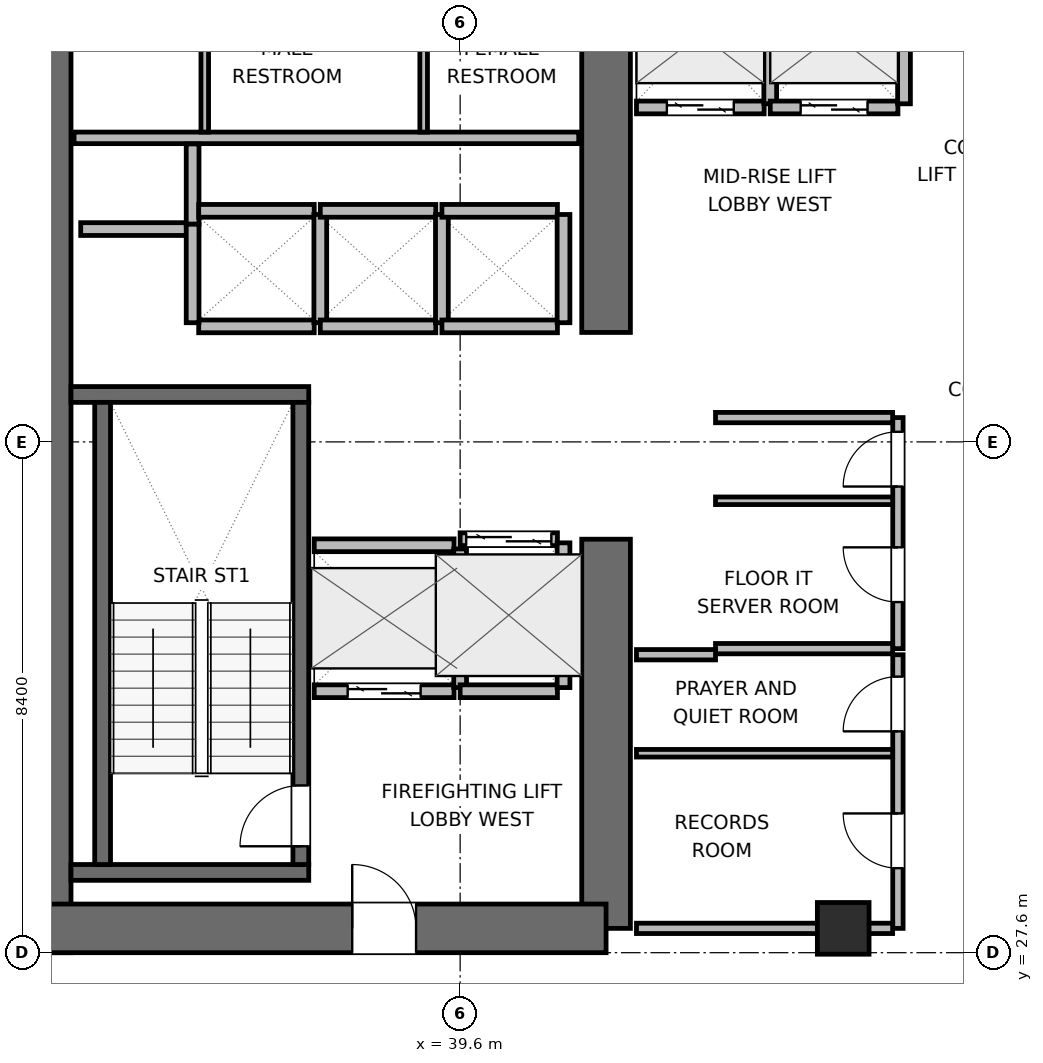
"""IFC4 building model, lengths in metres.
Left out: names, types, materials, properties, quantities, classifications, styles, units other than length and angle.
Written with IfcOpenShell. Run it as: python <this file> out.ifc"""

import sys

from ifc_helpers import new_model, si_unit, direction, frame, frame_2d, origin, origin_2d, place, context, subcontext, project, spatial, rectangle, extrude, element, fill, save


model = new_model("IFC4")
c1 = context("Model", 3, precision=1e-05, world=origin(), true_north=direction((0.0, 1.0)))
c2 = subcontext(c1, "Body", "Model", "MODEL_VIEW")
j1 = project(units=[si_unit("LENGTHUNIT", "METRE"), si_unit("PLANEANGLEUNIT", "RADIAN")], contexts=[c1])
p1 = place(None, origin())
s1 = spatial("IfcSite", under=j1, at=p1, CompositionType="ELEMENT")
p2 = place(p1, origin())
s2 = spatial("IfcBuilding", under=s1, at=p2, CompositionType="ELEMENT")
p3 = place(p2, frame((0.0, 0.0, 174.0)))
s3 = spatial("IfcBuildingStorey", under=s2, at=p3, CompositionType="ELEMENT", Elevation=174.0)
p4 = place(p3, frame((32.8, 27.6, 0.0), z_axis=(0.0, 0.0, 1.0), x_axis=(0.0, 1.0, 0.0)))
e1 = element("IfcWall", 1, at=p4, inside=s3, PredefinedType="SHEAR", context=c2, shape_type="SweptSolid", body=[
    extrude(rectangle(XDim=16.8, YDim=0.8, at=frame_2d((8.4, 0.0))), origin(), (0.0, 0.0, 1.0), 3.9),
])
p5 = place(p3, frame((42.0, 28.0, 0.0), z_axis=(0.0, 0.0, 1.0), x_axis=(0.0, 1.0, 0.0)))
e2 = element("IfcWall", 2, at=p5, inside=s3, PredefinedType="SHEAR", context=c2, shape_type="SweptSolid", body=[
    extrude(rectangle(XDim=6.4, YDim=0.8, at=frame_2d((3.2, 0.0))), origin(), (0.0, 0.0, 1.0), 3.9),
])
p6 = place(p3, frame((42.0, 37.8, 0.0), z_axis=(0.0, 0.0, 1.0), x_axis=(0.0, 1.0, 0.0)))
e3 = element("IfcWall", 3, at=p6, inside=s3, PredefinedType="SHEAR", context=c2, shape_type="SweptSolid", body=[
    extrude(rectangle(XDim=6.2, YDim=0.8, at=frame_2d((3.1, 0.0))), origin(), (0.0, 0.0, 1.0), 3.9),
])
p7 = place(p3, frame((32.8, 28.0, 0.0), z_axis=(0.0, 0.0, 1.0), x_axis=(1.0, 0.0, 0.0)))
e4 = element("IfcWall", 4, at=p7, inside=s3, PredefinedType="SHEAR", context=c2, shape_type="SweptSolid", body=[
    extrude(rectangle(XDim=9.2, YDim=0.8, at=frame_2d((4.6, 0.0))), origin(), (0.0, 0.0, 1.0), 3.9),
])
p8 = place(p7, frame((5.025, 0.0, 0.0)))
e5 = element("IfcOpeningElement", 5, at=p8, cuts=e4, PredefinedType="OPENING", context=c2, shape_type="SweptSolid", body=[
    extrude(rectangle(XDim=1.05, YDim=2.04, at=frame_2d((0.525, 1.02))), frame((0.0, 0.41, 0.0), z_axis=(0.0, -1.0, 0.0), x_axis=(1.0, 0.0, 0.0)), (0.0, 0.0, 1.0), 0.82),
])
for number, where, z_axis, x_axis in (
    (6, (33.2, 28.92, 0.0), (0.0, 0.0, 1.0), (1.0, 0.0, 0.0)),
    (7, (33.2, 36.78, 0.0), (0.0, 0.0, 1.0), (1.0, 0.0, 0.0)),
):
    element("IfcWall", number, at=place(p3, frame(where, z_axis=z_axis, x_axis=x_axis)), inside=s3, PredefinedType="SHEAR", context=c2, shape_type="SweptSolid", body=[
        extrude(rectangle(XDim=3.91, YDim=0.26, at=frame_2d((1.955, 0.0))), origin(), (0.0, 0.0, 1.0), 3.9),
    ])
p9 = place(p3, frame((33.72, 29.05, 0.0), z_axis=(0.0, 0.0, 1.0), x_axis=(0.0, 1.0, 0.0)))
e8 = element("IfcWall", 8, at=p9, inside=s3, PredefinedType="SHEAR", context=c2, shape_type="SweptSolid", body=[
    extrude(rectangle(XDim=7.6, YDim=0.26, at=frame_2d((3.8, 0.0))), origin(), (0.0, 0.0, 1.0), 3.9),
])
p10 = place(p3, frame((36.98, 29.05, 0.0), z_axis=(0.0, 0.0, 1.0), x_axis=(0.0, 1.0, 0.0)))
e9 = element("IfcWall", 9, at=p10, inside=s3, PredefinedType="SHEAR", context=c2, shape_type="SweptSolid", body=[
    extrude(rectangle(XDim=7.6, YDim=0.26, at=frame_2d((3.8, 0.0))), origin(), (0.0, 0.0, 1.0), 3.9),
])
p11 = place(p10, frame((0.3, 0.0, 0.0)))
e10 = element("IfcOpeningElement", 10, at=p11, cuts=e9, PredefinedType="OPENING", context=c2, shape_type="SweptSolid", body=[
    extrude(rectangle(XDim=1.0, YDim=2.04, at=frame_2d((0.5, 1.02))), frame((0.0, 0.14, 0.0), z_axis=(0.0, -1.0, 0.0), x_axis=(1.0, 0.0, 0.0)), (0.0, 0.0, 1.0), 0.28),
])
p12 = place(p3, frame((45.9, 28.0, 0.0), z_axis=(0.0, 0.0, 1.0), x_axis=(1.0, 0.0, 0.0)))
e11 = element("IfcColumn", 11, at=p12, inside=s3, PredefinedType="COLUMN", context=c2, shape_type="SweptSolid", body=[
    extrude(rectangle(XDim=0.85, YDim=0.85, at=origin_2d()), origin(), (0.0, 0.0, 1.0), 3.9),
])
p13 = place(p3, frame((33.25, 41.0, 0.0), z_axis=(0.0, 0.0, 1.0), x_axis=(1.0, 0.0, 0.0)))
e12 = element("IfcWall", 12, at=p13, inside=s3, PredefinedType="PLUMBINGWALL", context=c2, shape_type="SweptSolid", body=[
    extrude(rectangle(XDim=8.3, YDim=0.19, at=frame_2d((4.15, 0.0))), origin(), (0.0, 0.0, 1.0), 3.68),
])
for number, where, z_axis, x_axis in (
    (13, (35.4, 41.095, 0.0), (0.0, 0.0, 1.0), (0.0, 1.0, 0.0)),
    (14, (39.0, 41.095, 0.0), (0.0, 0.0, 1.0), (0.0, 1.0, 0.0)),
):
    element("IfcWall", number, at=place(p3, frame(where, z_axis=z_axis, x_axis=x_axis)), inside=s3, PredefinedType="PARTITIONING", context=c2, shape_type="SweptSolid", body=[
        extrude(rectangle(XDim=2.455, YDim=0.125, at=frame_2d((1.228, 0.0))), origin(), (0.0, 0.0, 1.0), 3.68),
    ])
p14 = place(p3, frame((33.36, 39.5, 0.0), z_axis=(0.0, 0.0, 1.0), x_axis=(1.0, 0.0, 0.0)))
e15 = element("IfcWall", 15, at=p14, inside=s3, PredefinedType="PARTITIONING", context=c2, shape_type="SweptSolid", body=[
    extrude(rectangle(XDim=1.86, YDim=0.21, at=frame_2d((0.93, 0.0))), origin(), (0.0, 0.0, 1.0), 3.68),
])
p15 = place(p3, frame((35.2, 39.58, 0.0), z_axis=(0.0, 0.0, 1.0), x_axis=(0.0, 1.0, 0.0)))
e16 = element("IfcWall", 16, at=p15, inside=s3, PredefinedType="PARTITIONING", context=c2, shape_type="SweptSolid", body=[
    extrude(rectangle(XDim=1.32, YDim=0.21, at=frame_2d((0.66, 0.0))), origin(), (0.0, 0.0, 1.0), 3.68),
])
p16 = place(p3, frame((37.2, 31.9, 0.0), z_axis=(0.0, 0.0, 1.0), x_axis=(1.0, 0.0, 0.0)))
e17 = element("IfcWall", 17, at=p16, inside=s3, PredefinedType="PARTITIONING", context=c2, shape_type="SweptSolid", body=[
    extrude(rectangle(XDim=2.3, YDim=0.21, at=frame_2d((1.15, 0.0))), origin(), (0.0, 0.0, 1.0), 3.68),
])
p17 = place(p16, frame((0.55, 0.0, 0.0)))
e18 = element("IfcOpeningElement", 18, at=p17, cuts=e17, PredefinedType="OPENING", context=c2, shape_type="SweptSolid", body=[
    extrude(rectangle(XDim=1.2, YDim=2.04, at=frame_2d((0.6, 1.02))), frame((0.0, 0.115, 0.0), z_axis=(0.0, -1.0, 0.0), x_axis=(1.0, 0.0, 0.0)), (0.0, 0.0, 1.0), 0.23),
])
p18 = place(p3, frame((37.2, 34.3, 0.0), z_axis=(0.0, 0.0, 1.0), x_axis=(1.0, 0.0, 0.0)))
e19 = element("IfcWall", 19, at=p18, inside=s3, PredefinedType="PARTITIONING", context=c2, shape_type="SweptSolid", body=[
    extrude(rectangle(XDim=2.3, YDim=0.21, at=frame_2d((1.15, 0.0))), origin(), (0.0, 0.0, 1.0), 3.68),
])
p19 = place(p3, frame((39.6, 31.96, 0.0), z_axis=(0.0, 0.0, 1.0), x_axis=(0.0, 1.0, 0.0)))
e20 = element("IfcWall", 20, at=p19, inside=s3, PredefinedType="PARTITIONING", context=c2, shape_type="SweptSolid", body=[
    extrude(rectangle(XDim=2.28, YDim=0.21, at=frame_2d((1.14, 0.0))), origin(), (0.0, 0.0, 1.0), 3.68),
])
p20 = place(p3, frame((39.6, 34.4, 0.0), z_axis=(0.0, 0.0, 1.0), x_axis=(1.0, 0.0, 0.0)))
e21 = element("IfcWall", 21, at=p20, inside=s3, PredefinedType="PARTITIONING", context=c2, shape_type="SweptSolid", body=[
    extrude(rectangle(XDim=1.6, YDim=0.21, at=frame_2d((0.8, 0.0))), origin(), (0.0, 0.0, 1.0), 3.68),
])
p21 = place(p20, frame((0.1, 0.0, 0.0)))
e22 = element("IfcOpeningElement", 22, at=p21, cuts=e21, PredefinedType="OPENING", context=c2, shape_type="SweptSolid", body=[
    extrude(rectangle(XDim=1.4, YDim=2.06, at=frame_2d((0.7, 1.03))), frame((0.0, 0.115, 0.0), z_axis=(0.0, -1.0, 0.0), x_axis=(1.0, 0.0, 0.0)), (0.0, 0.0, 1.0), 0.23),
])
p22 = place(p3, frame((39.6, 31.9, 0.0), z_axis=(0.0, 0.0, 1.0), x_axis=(1.0, 0.0, 0.0)))
e23 = element("IfcWall", 23, at=p22, inside=s3, PredefinedType="PARTITIONING", context=c2, shape_type="SweptSolid", body=[
    extrude(rectangle(XDim=1.6, YDim=0.21, at=frame_2d((0.8, 0.0))), origin(), (0.0, 0.0, 1.0), 3.68),
])
p23 = place(p3, frame((41.3, 31.96, 0.0), z_axis=(0.0, 0.0, 1.0), x_axis=(0.0, 1.0, 0.0)))
e24 = element("IfcWall", 24, at=p23, inside=s3, PredefinedType="PARTITIONING", context=c2, shape_type="SweptSolid", body=[
    extrude(rectangle(XDim=2.38, YDim=0.21, at=frame_2d((1.19, 0.0))), origin(), (0.0, 0.0, 1.0), 3.68),
])
p24 = place(p3, frame((42.5, 41.5, 0.0), z_axis=(0.0, 0.0, 1.0), x_axis=(1.0, 0.0, 0.0)))
e25 = element("IfcWall", 25, at=p24, inside=s3, PredefinedType="PARTITIONING", context=c2, shape_type="SweptSolid", body=[
    extrude(rectangle(XDim=2.1, YDim=0.21, at=frame_2d((1.05, 0.0))), origin(), (0.0, 0.0, 1.0), 3.68),
])
p25 = place(p24, frame((0.5, 0.0, 0.0)))
e26 = element("IfcOpeningElement", 26, at=p25, cuts=e25, PredefinedType="OPENING", context=c2, shape_type="SweptSolid", body=[
    extrude(rectangle(XDim=1.1, YDim=2.04, at=frame_2d((0.55, 1.02))), frame((0.0, 0.115, 0.0), z_axis=(0.0, -1.0, 0.0), x_axis=(1.0, 0.0, 0.0)), (0.0, 0.0, 1.0), 0.23),
])
p26 = place(p3, frame((44.7, 41.56, 0.0), z_axis=(0.0, 0.0, 1.0), x_axis=(0.0, 1.0, 0.0)))
e27 = element("IfcWall", 27, at=p26, inside=s3, PredefinedType="PARTITIONING", context=c2, shape_type="SweptSolid", body=[
    extrude(rectangle(XDim=2.28, YDim=0.21, at=frame_2d((1.14, 0.0))), origin(), (0.0, 0.0, 1.0), 3.68),
])
p27 = place(p3, frame((44.7, 41.5, 0.0), z_axis=(0.0, 0.0, 1.0), x_axis=(1.0, 0.0, 0.0)))
e28 = element("IfcWall", 28, at=p27, inside=s3, PredefinedType="PARTITIONING", context=c2, shape_type="SweptSolid", body=[
    extrude(rectangle(XDim=2.1, YDim=0.21, at=frame_2d((1.05, 0.0))), origin(), (0.0, 0.0, 1.0), 3.68),
])
p28 = place(p27, frame((0.5, 0.0, 0.0)))
e29 = element("IfcOpeningElement", 29, at=p28, cuts=e28, PredefinedType="OPENING", context=c2, shape_type="SweptSolid", body=[
    extrude(rectangle(XDim=1.1, YDim=2.04, at=frame_2d((0.55, 1.02))), frame((0.0, 0.115, 0.0), z_axis=(0.0, -1.0, 0.0), x_axis=(1.0, 0.0, 0.0)), (0.0, 0.0, 1.0), 0.23),
])
p29 = place(p3, frame((46.9, 41.56, 0.0), z_axis=(0.0, 0.0, 1.0), x_axis=(0.0, 1.0, 0.0)))
e30 = element("IfcWall", 30, at=p29, inside=s3, PredefinedType="PARTITIONING", context=c2, shape_type="SweptSolid", body=[
    extrude(rectangle(XDim=2.28, YDim=0.21, at=frame_2d((1.14, 0.0))), origin(), (0.0, 0.0, 1.0), 3.68),
])
for number, where, z_axis, x_axis in (
    (31, (35.3, 37.9, 0.0), (0.0, 0.0, 1.0), (1.0, 0.0, 0.0)),
    (32, (35.3, 39.8, 0.0), (0.0, 0.0, 1.0), (1.0, 0.0, 0.0)),
):
    element("IfcWall", number, at=place(p3, frame(where, z_axis=z_axis, x_axis=x_axis)), inside=s3, PredefinedType="PARTITIONING", context=c2, shape_type="SweptSolid", body=[
        extrude(rectangle(XDim=1.9, YDim=0.21, at=frame_2d((0.95, 0.0))), origin(), (0.0, 0.0, 1.0), 3.68),
    ])
p30 = place(p3, frame((35.2, 37.96, 0.0), z_axis=(0.0, 0.0, 1.0), x_axis=(0.0, 1.0, 0.0)))
e33 = element("IfcWall", 33, at=p30, inside=s3, PredefinedType="PARTITIONING", context=c2, shape_type="SweptSolid", body=[
    extrude(rectangle(XDim=1.62, YDim=0.21, at=frame_2d((0.81, 0.0))), origin(), (0.0, 0.0, 1.0), 3.68),
])
p31 = place(p3, frame((37.3, 37.96, 0.0), z_axis=(0.0, 0.0, 1.0), x_axis=(0.0, 1.0, 0.0)))
e34 = element("IfcWall", 34, at=p31, inside=s3, PredefinedType="PARTITIONING", context=c2, shape_type="SweptSolid", body=[
    extrude(rectangle(XDim=1.78, YDim=0.21, at=frame_2d((0.89, 0.0))), origin(), (0.0, 0.0, 1.0), 3.68),
])
for number, where, z_axis, x_axis in (
    (35, (37.3, 37.9, 0.0), (0.0, 0.0, 1.0), (1.0, 0.0, 0.0)),
    (36, (37.3, 39.8, 0.0), (0.0, 0.0, 1.0), (1.0, 0.0, 0.0)),
):
    element("IfcWall", number, at=place(p3, frame(where, z_axis=z_axis, x_axis=x_axis)), inside=s3, PredefinedType="PARTITIONING", context=c2, shape_type="SweptSolid", body=[
        extrude(rectangle(XDim=1.9, YDim=0.21, at=frame_2d((0.95, 0.0))), origin(), (0.0, 0.0, 1.0), 3.68),
    ])
p32 = place(p3, frame((39.3, 37.96, 0.0), z_axis=(0.0, 0.0, 1.0), x_axis=(0.0, 1.0, 0.0)))
e37 = element("IfcWall", 37, at=p32, inside=s3, PredefinedType="PARTITIONING", context=c2, shape_type="SweptSolid", body=[
    extrude(rectangle(XDim=1.78, YDim=0.21, at=frame_2d((0.89, 0.0))), origin(), (0.0, 0.0, 1.0), 3.68),
])
for number, where, z_axis, x_axis in (
    (38, (39.3, 37.9, 0.0), (0.0, 0.0, 1.0), (1.0, 0.0, 0.0)),
    (39, (39.3, 39.8, 0.0), (0.0, 0.0, 1.0), (1.0, 0.0, 0.0)),
):
    element("IfcWall", number, at=place(p3, frame(where, z_axis=z_axis, x_axis=x_axis)), inside=s3, PredefinedType="PARTITIONING", context=c2, shape_type="SweptSolid", body=[
        extrude(rectangle(XDim=1.9, YDim=0.21, at=frame_2d((0.95, 0.0))), origin(), (0.0, 0.0, 1.0), 3.68),
    ])
p33 = place(p3, frame((41.3, 37.96, 0.0), z_axis=(0.0, 0.0, 1.0), x_axis=(0.0, 1.0, 0.0)))
e40 = element("IfcWall", 40, at=p33, inside=s3, PredefinedType="PARTITIONING", context=c2, shape_type="SweptSolid", body=[
    extrude(rectangle(XDim=1.78, YDim=0.21, at=frame_2d((0.89, 0.0))), origin(), (0.0, 0.0, 1.0), 3.68),
])
p34 = place(p3, frame((46.8, 32.6, 0.0), z_axis=(0.0, 0.0, 1.0), x_axis=(0.0, 1.0, 0.0)))
e41 = element("IfcWall", 41, at=p34, inside=s3, PredefinedType="PARTITIONING", context=c2, shape_type="SweptSolid", body=[
    extrude(rectangle(XDim=3.8, YDim=0.17, at=frame_2d((1.9, 0.0))), origin(), (0.0, 0.0, 1.0), 3.68),
])
p35 = place(p34, frame((0.766, 0.0, 0.0)))
e42 = element("IfcOpeningElement", 42, at=p35, cuts=e41, PredefinedType="OPENING", context=c2, shape_type="SweptSolid", body=[
    extrude(rectangle(XDim=0.9, YDim=2.02, at=frame_2d((0.45, 1.01))), frame((0.0, 0.095, 0.0), z_axis=(0.0, -1.0, 0.0), x_axis=(1.0, 0.0, 0.0)), (0.0, 0.0, 1.0), 0.19),
])
p36 = place(p34, frame((2.666, 0.0, 0.0)))
e43 = element("IfcOpeningElement", 43, at=p36, cuts=e41, PredefinedType="OPENING", context=c2, shape_type="SweptSolid", body=[
    extrude(rectangle(XDim=0.9, YDim=2.02, at=frame_2d((0.45, 1.01))), frame((0.0, 0.095, 0.0), z_axis=(0.0, -1.0, 0.0), x_axis=(1.0, 0.0, 0.0)), (0.0, 0.0, 1.0), 0.19),
])
for number, where, z_axis, x_axis in (
    (44, (43.8, 32.6, 0.0), (0.0, 0.0, 1.0), (1.0, 0.0, 0.0)),
    (45, (43.8, 36.4, 0.0), (0.0, 0.0, 1.0), (1.0, 0.0, 0.0)),
):
    element("IfcWall", number, at=place(p3, frame(where, z_axis=z_axis, x_axis=x_axis)), inside=s3, PredefinedType="PARTITIONING", context=c2, shape_type="SweptSolid", body=[
        extrude(rectangle(XDim=2.913, YDim=0.17, at=frame_2d((1.457, 0.0))), origin(), (0.0, 0.0, 1.0), 3.68),
    ])
p37 = place(p3, frame((43.8, 35.032, 0.0), z_axis=(0.0, 0.0, 1.0), x_axis=(1.0, 0.0, 0.0)))
e46 = element("IfcWall", 46, at=p37, inside=s3, PredefinedType="PARTITIONING", context=c2, shape_type="SweptSolid", body=[
    extrude(rectangle(XDim=2.913, YDim=0.125, at=frame_2d((1.457, 0.0))), origin(), (0.0, 0.0, 1.0), 3.68),
])
p38 = place(p3, frame((46.8, 28.0, 0.0), z_axis=(0.0, 0.0, 1.0), x_axis=(0.0, 1.0, 0.0)))
e47 = element("IfcWall", 47, at=p38, inside=s3, PredefinedType="PARTITIONING", context=c2, shape_type="SweptSolid", body=[
    extrude(rectangle(XDim=4.5, YDim=0.17, at=frame_2d((2.25, 0.0))), origin(), (0.0, 0.0, 1.0), 3.68),
])
p39 = place(p38, frame((0.99, 0.0, 0.0)))
e48 = element("IfcOpeningElement", 48, at=p39, cuts=e47, PredefinedType="OPENING", context=c2, shape_type="SweptSolid", body=[
    extrude(rectangle(XDim=0.9, YDim=2.02, at=frame_2d((0.45, 1.01))), frame((0.0, 0.095, 0.0), z_axis=(0.0, -1.0, 0.0), x_axis=(1.0, 0.0, 0.0)), (0.0, 0.0, 1.0), 0.19),
])
p40 = place(p38, frame((3.24, 0.0, 0.0)))
e49 = element("IfcOpeningElement", 49, at=p40, cuts=e47, PredefinedType="OPENING", context=c2, shape_type="SweptSolid", body=[
    extrude(rectangle(XDim=0.9, YDim=2.02, at=frame_2d((0.45, 1.01))), frame((0.0, 0.095, 0.0), z_axis=(0.0, -1.0, 0.0), x_axis=(1.0, 0.0, 0.0)), (0.0, 0.0, 1.0), 0.19),
])
p41 = place(p3, frame((42.5, 28.0, 0.0), z_axis=(0.0, 0.0, 1.0), x_axis=(1.0, 0.0, 0.0)))
e50 = element("IfcWall", 50, at=p41, inside=s3, PredefinedType="PARTITIONING", context=c2, shape_type="SweptSolid", body=[
    extrude(rectangle(XDim=4.213, YDim=0.17, at=frame_2d((2.106, 0.0))), origin(), (0.0, 0.0, 1.0), 2.765),
])
p42 = place(p3, frame((42.5, 32.5, 0.0), z_axis=(0.0, 0.0, 1.0), x_axis=(1.0, 0.0, 0.0)))
e51 = element("IfcWall", 51, at=p42, inside=s3, PredefinedType="PARTITIONING", context=c2, shape_type="SweptSolid", body=[
    extrude(rectangle(XDim=1.3, YDim=0.17, at=frame_2d((0.65, 0.0))), origin(), (0.0, 0.0, 1.0), 3.68),
])
p43 = place(p3, frame((42.5, 30.88, 0.0), z_axis=(0.0, 0.0, 1.0), x_axis=(1.0, 0.0, 0.0)))
e52 = element("IfcWall", 52, at=p43, inside=s3, PredefinedType="PARTITIONING", context=c2, shape_type="SweptSolid", body=[
    extrude(rectangle(XDim=4.213, YDim=0.125, at=frame_2d((2.106, 0.0))), origin(), (0.0, 0.0, 1.0), 3.68),
])
p44 = place(p11, origin())
e53 = element("IfcDoor", 53, at=p44, inside=s3, OperationType="SINGLE_SWING_LEFT", PredefinedType="DOOR", context=c2, shape_type="SweptSolid", body=[
    extrude(rectangle(XDim=1.0, YDim=2.04, at=frame_2d((0.5, 1.02))), frame((0.0, 0.025, 0.0), z_axis=(0.0, -1.0, 0.0), x_axis=(1.0, 0.0, 0.0)), (0.0, 0.0, 1.0), 0.05),
])
fill(e10, e53)
p45 = place(p17, origin())
e54 = element("IfcDoor", 54, at=p45, inside=s3, OperationType="DOUBLE_DOOR_SLIDING", PredefinedType="DOOR", context=c2, shape_type="SweptSolid", body=[
    extrude(rectangle(XDim=1.2, YDim=2.04, at=frame_2d((0.6, 1.02))), frame((0.0, 0.025, 0.0), z_axis=(0.0, -1.0, 0.0), x_axis=(1.0, 0.0, 0.0)), (0.0, 0.0, 1.0), 0.05),
])
fill(e18, e54)
p46 = place(p21, origin())
e55 = element("IfcDoor", 55, at=p46, inside=s3, OperationType="DOUBLE_DOOR_SLIDING", PredefinedType="DOOR", context=c2, shape_type="SweptSolid", body=[
    extrude(rectangle(XDim=1.4, YDim=2.06, at=frame_2d((0.7, 1.03))), frame((0.0, 0.025, 0.0), z_axis=(0.0, -1.0, 0.0), x_axis=(1.0, 0.0, 0.0)), (0.0, 0.0, 1.0), 0.05),
])
fill(e22, e55)
p47 = place(p25, origin())
e56 = element("IfcDoor", 56, at=p47, inside=s3, OperationType="DOUBLE_DOOR_SLIDING", PredefinedType="DOOR", context=c2, shape_type="SweptSolid", body=[
    extrude(rectangle(XDim=1.1, YDim=2.04, at=frame_2d((0.55, 1.02))), frame((0.0, 0.025, 0.0), z_axis=(0.0, -1.0, 0.0), x_axis=(1.0, 0.0, 0.0)), (0.0, 0.0, 1.0), 0.05),
])
fill(e26, e56)
p48 = place(p28, origin())
e57 = element("IfcDoor", 57, at=p48, inside=s3, OperationType="DOUBLE_DOOR_SLIDING", PredefinedType="DOOR", context=c2, shape_type="SweptSolid", body=[
    extrude(rectangle(XDim=1.1, YDim=2.04, at=frame_2d((0.55, 1.02))), frame((0.0, 0.025, 0.0), z_axis=(0.0, -1.0, 0.0), x_axis=(1.0, 0.0, 0.0)), (0.0, 0.0, 1.0), 0.05),
])
fill(e29, e57)
p49 = place(p8, origin())
e58 = element("IfcDoor", 58, at=p49, inside=s3, OperationType="SINGLE_SWING_LEFT", PredefinedType="DOOR", context=c2, shape_type="SweptSolid", body=[
    extrude(rectangle(XDim=1.05, YDim=2.04, at=frame_2d((0.525, 1.02))), frame((0.0, 0.025, 0.0), z_axis=(0.0, -1.0, 0.0), x_axis=(1.0, 0.0, 0.0)), (0.0, 0.0, 1.0), 0.05),
])
fill(e5, e58)
p50 = place(p35, origin())
e59 = element("IfcDoor", 59, at=p50, inside=s3, OperationType="SINGLE_SWING_RIGHT", PredefinedType="DOOR", context=c2, shape_type="SweptSolid", body=[
    extrude(rectangle(XDim=0.9, YDim=2.02, at=frame_2d((0.45, 1.01))), frame((0.0, 0.025, 0.0), z_axis=(0.0, -1.0, 0.0), x_axis=(1.0, 0.0, 0.0)), (0.0, 0.0, 1.0), 0.05),
])
fill(e42, e59)
p51 = place(p36, origin())
e60 = element("IfcDoor", 60, at=p51, inside=s3, OperationType="SINGLE_SWING_LEFT", PredefinedType="DOOR", context=c2, shape_type="SweptSolid", body=[
    extrude(rectangle(XDim=0.9, YDim=2.02, at=frame_2d((0.45, 1.01))), frame((0.0, 0.025, 0.0), z_axis=(0.0, -1.0, 0.0), x_axis=(1.0, 0.0, 0.0)), (0.0, 0.0, 1.0), 0.05),
])
fill(e43, e60)
p52 = place(p39, origin())
e61 = element("IfcDoor", 61, at=p52, inside=s3, OperationType="SINGLE_SWING_RIGHT", PredefinedType="DOOR", context=c2, shape_type="SweptSolid", body=[
    extrude(rectangle(XDim=0.9, YDim=2.02, at=frame_2d((0.45, 1.01))), frame((0.0, 0.025, 0.0), z_axis=(0.0, -1.0, 0.0), x_axis=(1.0, 0.0, 0.0)), (0.0, 0.0, 1.0), 0.05),
])
fill(e48, e61)
p53 = place(p40, origin())
e62 = element("IfcDoor", 62, at=p53, inside=s3, OperationType="SINGLE_SWING_LEFT", PredefinedType="DOOR", context=c2, shape_type="SweptSolid", body=[
    extrude(rectangle(XDim=0.9, YDim=2.02, at=frame_2d((0.45, 1.01))), frame((0.0, 0.025, 0.0), z_axis=(0.0, -1.0, 0.0), x_axis=(1.0, 0.0, 0.0)), (0.0, 0.0, 1.0), 0.05),
])
fill(e49, e62)
save(model, sys.argv[1])
